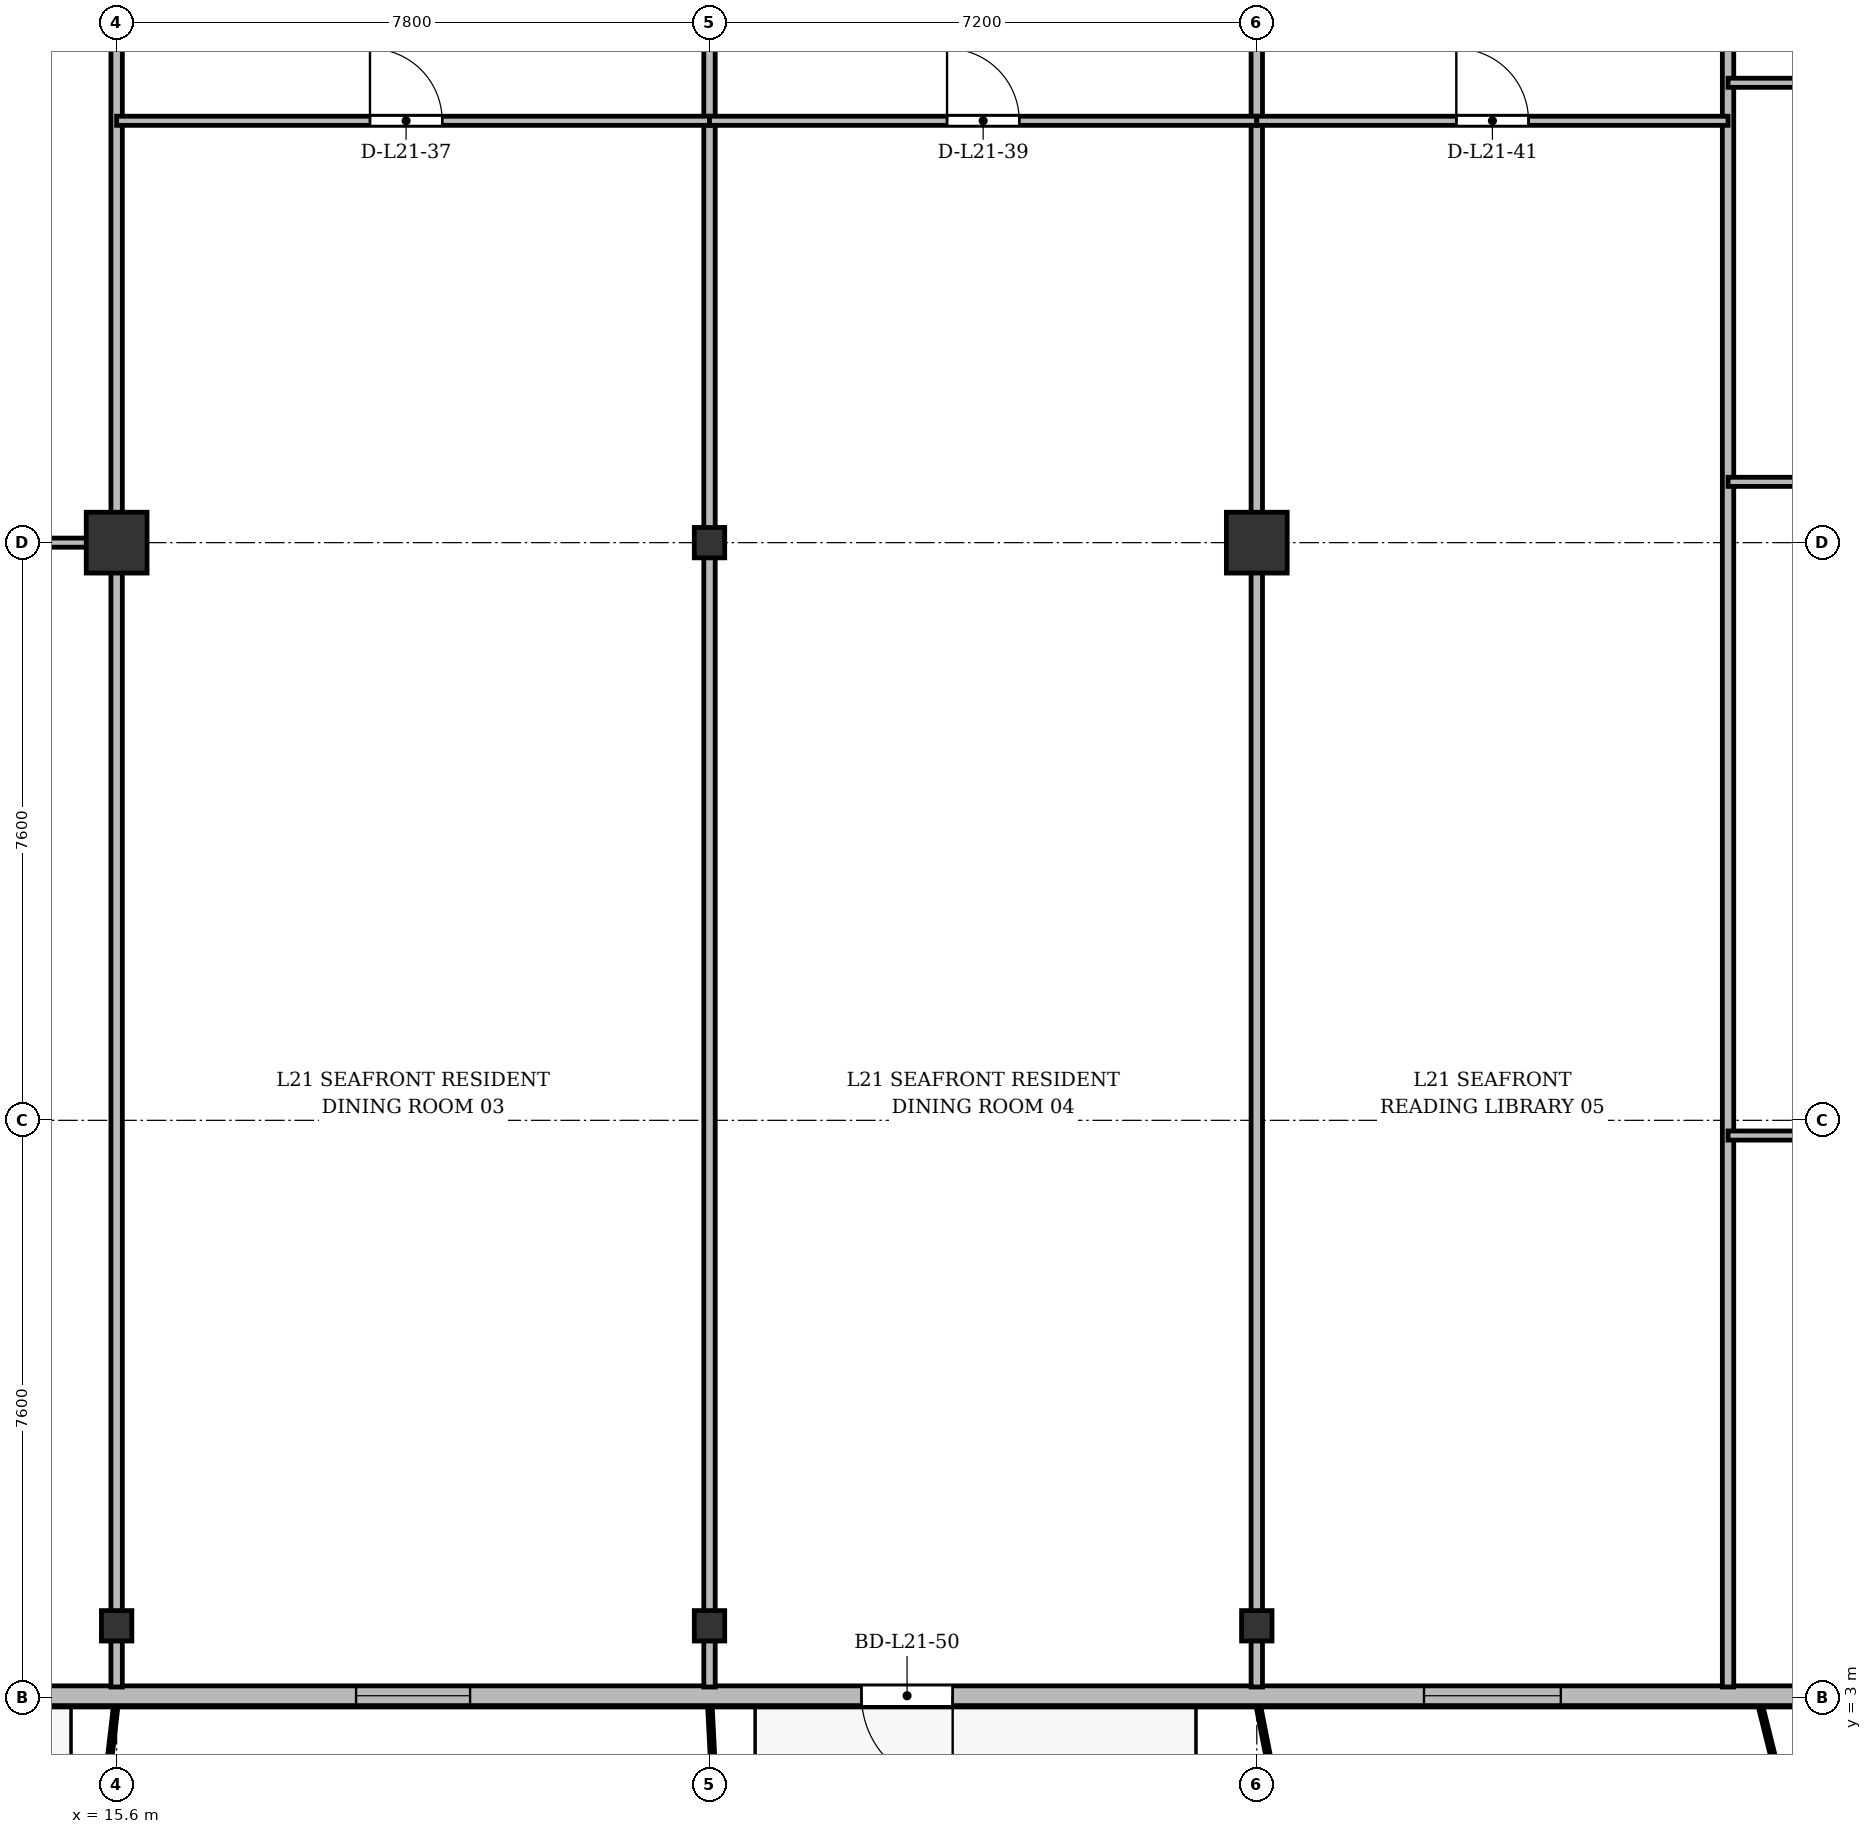
"""IFC4 building model, lengths in metres.
Left out: names, types, materials, properties, quantities, classifications, styles, units other than length and angle.
Written with IfcOpenShell. Run it as: python <this file> out.ifc"""

import sys

from ifc_helpers import new_model, si_unit, direction, frame, frame_2d, origin, origin_2d, place, context, subcontext, project, spatial, rectangle, i_section, extrude, source, transform, mapped, element, fill, save


model = new_model("IFC4")
c1 = context("Model", 3, precision=1e-05, world=origin(), true_north=direction((0.0, 1.0)))
c2 = subcontext(c1, "Body", "Model", "MODEL_VIEW")
j1 = project(units=[si_unit("LENGTHUNIT", "METRE"), si_unit("PLANEANGLEUNIT", "RADIAN")], contexts=[c1])
p1 = place(None, origin())
s1 = spatial("IfcSite", under=j1, at=p1, CompositionType="ELEMENT")
p2 = place(p1, origin())
s2 = spatial("IfcBuilding", under=s1, at=p2, CompositionType="ELEMENT")
p3 = place(p2, frame((0.0, 0.0, 85.3)))
s3 = spatial("IfcBuildingStorey", under=s2, at=p3, CompositionType="ELEMENT", Elevation=85.3)
m1 = source(origin(), c2, "Body", "SweptSolid", [
    extrude(i_section(OverallWidth=0.4, OverallDepth=0.4, WebThickness=0.022, FlangeThickness=0.035, at=origin_2d()), origin(), (0.0, 0.0, 1.0), 3.6),
])
p4 = place(p3, frame((15.6, 3.95, 0.0), z_axis=(0.0, 0.0, 1.0), x_axis=(1.0, 0.0, 0.0)))
e1 = element("IfcColumn", 1, at=p4, inside=s3, PredefinedType="COLUMN", context=c2, shape_type="MappedRepresentation", body=[
    mapped(m1, transform((0.0, 0.0, 0.0), x_axis=(1.0, 0.0, 0.0), y_axis=(0.0, 1.0, 0.0), z_axis=(0.0, 0.0, 1.0), scale=1.0)),
])
m2 = source(origin(), c2, "Body", "SweptSolid", [
    extrude(rectangle(XDim=0.8, YDim=0.8, at=origin_2d()), origin(), (0.0, 0.0, 1.0), 3.6),
])
p5 = place(p3, frame((15.6, 18.2, 0.0), z_axis=(0.0, 0.0, 1.0), x_axis=(1.0, 0.0, 0.0)))
e2 = element("IfcColumn", 2, at=p5, inside=s3, PredefinedType="COLUMN", context=c2, shape_type="MappedRepresentation", body=[
    mapped(m2, transform((0.0, 0.0, 0.0), x_axis=(1.0, 0.0, 0.0), y_axis=(0.0, 1.0, 0.0), z_axis=(0.0, 0.0, 1.0), scale=1.0)),
])
for number, where, z_axis, x_axis in (
    (3, (23.4, 3.95, 0.0), (0.0, 0.0, 1.0), (1.0, 0.0, 0.0)),
    (4, (23.4, 18.2, 0.0), (0.0, 0.0, 1.0), (1.0, 0.0, 0.0)),
    (5, (30.6, 3.95, 0.0), (0.0, 0.0, 1.0), (1.0, 0.0, 0.0)),
):
    element("IfcColumn", number, at=place(p3, frame(where, z_axis=z_axis, x_axis=x_axis)), inside=s3, PredefinedType="COLUMN", context=c2, shape_type="MappedRepresentation", body=[
        mapped(m1, transform((0.0, 0.0, 0.0), x_axis=(1.0, 0.0, 0.0), y_axis=(0.0, 1.0, 0.0), z_axis=(0.0, 0.0, 1.0), scale=1.0)),
    ])
p6 = place(p3, frame((30.6, 18.2, 0.0), z_axis=(0.0, 0.0, 1.0), x_axis=(1.0, 0.0, 0.0)))
e6 = element("IfcColumn", 6, at=p6, inside=s3, PredefinedType="COLUMN", context=c2, shape_type="MappedRepresentation", body=[
    mapped(m2, transform((0.0, 0.0, 0.0), x_axis=(1.0, 0.0, 0.0), y_axis=(0.0, 1.0, 0.0), z_axis=(0.0, 0.0, 1.0), scale=1.0)),
])
p7 = place(p3, frame((66.9, 3.03, 0.0), z_axis=(0.0, 0.0, 1.0), x_axis=(-1.0, 0.0, 0.0)))
e7 = element("IfcWall", 7, at=p7, inside=s3, PredefinedType="SOLIDWALL", context=c2, shape_type="SweptSolid", body=[
    extrude(rectangle(XDim=59.4, YDim=0.26, at=frame_2d((29.7, 0.0))), origin(), (0.0, 0.0, 1.0), 3.34),
])
p8 = place(p7, frame((0.595, 0.0, 0.9)))
e8 = element("IfcOpeningElement", 8, at=p8, cuts=e7, PredefinedType="OPENING", context=c2, shape_type="SweptSolid", body=[
    extrude(rectangle(XDim=2.2, YDim=1.8, at=frame_2d((1.1, 0.9))), frame((0.0, 0.14, 0.0), z_axis=(0.0, -1.0, 0.0), x_axis=(1.0, 0.0, 0.0)), (0.0, 0.0, 1.0), 0.28),
])
p9 = place(p7, frame((4.95, 0.0, 0.9)))
e9 = element("IfcOpeningElement", 9, at=p9, cuts=e7, PredefinedType="OPENING", context=c2, shape_type="SweptSolid", body=[
    extrude(rectangle(XDim=1.5, YDim=1.75, at=frame_2d((0.75, 0.875))), frame((0.0, 0.14, 0.0), z_axis=(0.0, -1.0, 0.0), x_axis=(1.0, 0.0, 0.0)), (0.0, 0.0, 1.0), 0.28),
])
p10 = place(p7, frame((9.18, 0.0, 0.0)))
e10 = element("IfcOpeningElement", 10, at=p10, cuts=e7, PredefinedType="OPENING", context=c2, shape_type="SweptSolid", body=[
    extrude(rectangle(XDim=1.2, YDim=2.2, at=frame_2d((0.6, 1.1))), frame((0.0, 0.14, 0.0), z_axis=(0.0, -1.0, 0.0), x_axis=(1.0, 0.0, 0.0)), (0.0, 0.0, 1.0), 0.28),
])
p11 = place(p7, frame((13.125, 0.0, 0.9)))
e11 = element("IfcOpeningElement", 11, at=p11, cuts=e7, PredefinedType="OPENING", context=c2, shape_type="SweptSolid", body=[
    extrude(rectangle(XDim=1.65, YDim=1.85, at=frame_2d((0.825, 0.925))), frame((0.0, 0.14, 0.0), z_axis=(0.0, -1.0, 0.0), x_axis=(1.0, 0.0, 0.0)), (0.0, 0.0, 1.0), 0.28),
])
p12 = place(p7, frame((16.2, 0.0, 0.9)))
e12 = element("IfcOpeningElement", 12, at=p12, cuts=e7, PredefinedType="OPENING", context=c2, shape_type="SweptSolid", body=[
    extrude(rectangle(XDim=1.8, YDim=1.8, at=frame_2d((0.9, 0.9))), frame((0.0, 0.14, 0.0), z_axis=(0.0, -1.0, 0.0), x_axis=(1.0, 0.0, 0.0)), (0.0, 0.0, 1.0), 0.28),
])
p13 = place(p7, frame((18.75, 0.0, 0.9)))
e13 = element("IfcOpeningElement", 13, at=p13, cuts=e7, PredefinedType="OPENING", context=c2, shape_type="SweptSolid", body=[
    extrude(rectangle(XDim=1.5, YDim=1.75, at=frame_2d((0.75, 0.875))), frame((0.0, 0.14, 0.0), z_axis=(0.0, -1.0, 0.0), x_axis=(1.0, 0.0, 0.0)), (0.0, 0.0, 1.0), 0.28),
])
p14 = place(p7, frame((21.15, 0.0, 0.9)))
e14 = element("IfcOpeningElement", 14, at=p14, cuts=e7, PredefinedType="OPENING", context=c2, shape_type="SweptSolid", body=[
    extrude(rectangle(XDim=1.5, YDim=1.75, at=frame_2d((0.75, 0.875))), frame((0.0, 0.14, 0.0), z_axis=(0.0, -1.0, 0.0), x_axis=(1.0, 0.0, 0.0)), (0.0, 0.0, 1.0), 0.28),
])
p15 = place(p7, frame((23.85, 0.0, 0.9)))
e15 = element("IfcOpeningElement", 15, at=p15, cuts=e7, PredefinedType="OPENING", context=c2, shape_type="SweptSolid", body=[
    extrude(rectangle(XDim=2.0, YDim=1.95, at=frame_2d((1.0, 0.975))), frame((0.0, 0.14, 0.0), z_axis=(0.0, -1.0, 0.0), x_axis=(1.0, 0.0, 0.0)), (0.0, 0.0, 1.0), 0.28),
])
p16 = place(p7, frame((27.525, 0.0, 0.9)))
e16 = element("IfcOpeningElement", 16, at=p16, cuts=e7, PredefinedType="OPENING", context=c2, shape_type="SweptSolid", body=[
    extrude(rectangle(XDim=1.65, YDim=1.85, at=frame_2d((0.825, 0.925))), frame((0.0, 0.14, 0.0), z_axis=(0.0, -1.0, 0.0), x_axis=(1.0, 0.0, 0.0)), (0.0, 0.0, 1.0), 0.28),
])
p17 = place(p7, frame((32.3, 0.0, 0.9)))
e17 = element("IfcOpeningElement", 17, at=p17, cuts=e7, PredefinedType="OPENING", context=c2, shape_type="SweptSolid", body=[
    extrude(rectangle(XDim=1.8, YDim=1.8, at=frame_2d((0.9, 0.9))), frame((0.0, 0.14, 0.0), z_axis=(0.0, -1.0, 0.0), x_axis=(1.0, 0.0, 0.0)), (0.0, 0.0, 1.0), 0.28),
])
p18 = place(p7, frame((40.301, 0.0, 0.0)))
e18 = element("IfcOpeningElement", 18, at=p18, cuts=e7, PredefinedType="OPENING", context=c2, shape_type="SweptSolid", body=[
    extrude(rectangle(XDim=1.2, YDim=2.2, at=frame_2d((0.6, 1.1))), frame((0.0, 0.14, 0.0), z_axis=(0.0, -1.0, 0.0), x_axis=(1.0, 0.0, 0.0)), (0.0, 0.0, 1.0), 0.28),
])
p19 = place(p7, frame((46.65, 0.0, 0.9)))
e19 = element("IfcOpeningElement", 19, at=p19, cuts=e7, PredefinedType="OPENING", context=c2, shape_type="SweptSolid", body=[
    extrude(rectangle(XDim=1.5, YDim=1.75, at=frame_2d((0.75, 0.875))), frame((0.0, 0.14, 0.0), z_axis=(0.0, -1.0, 0.0), x_axis=(1.0, 0.0, 0.0)), (0.0, 0.0, 1.0), 0.28),
])
p20 = place(p7, frame((54.558, 0.0, 0.0)))
e20 = element("IfcOpeningElement", 20, at=p20, cuts=e7, PredefinedType="OPENING", context=c2, shape_type="SweptSolid", body=[
    extrude(rectangle(XDim=1.2, YDim=2.2, at=frame_2d((0.6, 1.1))), frame((0.0, 0.14, 0.0), z_axis=(0.0, -1.0, 0.0), x_axis=(1.0, 0.0, 0.0)), (0.0, 0.0, 1.0), 0.28),
])
p21 = place(p7, frame((56.98, 0.0, 0.9)))
e21 = element("IfcOpeningElement", 21, at=p21, cuts=e7, PredefinedType="OPENING", context=c2, shape_type="SweptSolid", body=[
    extrude(rectangle(XDim=1.65, YDim=1.85, at=frame_2d((0.825, 0.925))), frame((0.0, 0.14, 0.0), z_axis=(0.0, -1.0, 0.0), x_axis=(1.0, 0.0, 0.0)), (0.0, 0.0, 1.0), 0.28),
])
for number, where, z_axis, x_axis in (
    (22, (15.6, 3.145, 0.0), (0.0, 0.0, 1.0), (0.0, 1.0, 0.0)),
    (23, (23.4, 3.145, 0.0), (0.0, 0.0, 1.0), (0.0, 1.0, 0.0)),
    (24, (30.6, 3.145, 0.0), (0.0, 0.0, 1.0), (0.0, 1.0, 0.0)),
):
    element("IfcWall", number, at=place(p3, frame(where, z_axis=z_axis, x_axis=x_axis)), inside=s3, PredefinedType="PARTITIONING", context=c2, shape_type="SweptSolid", body=[
        extrude(rectangle(XDim=24.455, YDim=0.15, at=frame_2d((12.228, 0.0))), origin(), (0.0, 0.0, 1.0), 2.84),
    ])
p22 = place(p3, frame((36.8, 3.145, 0.0), z_axis=(0.0, 0.0, 1.0), x_axis=(0.0, 1.0, 0.0)))
e25 = element("IfcWall", 25, at=p22, inside=s3, PredefinedType="PARTITIONING", context=c2, shape_type="SweptSolid", body=[
    extrude(rectangle(XDim=24.455, YDim=0.15, at=frame_2d((12.228, 0.0))), origin(), (0.0, 0.0, 1.0), 2.752),
])
p23 = place(p3, frame((10.6, 18.2, 0.0), z_axis=(0.0, 0.0, 1.0), x_axis=(1.0, 0.0, 0.0)))
e26 = element("IfcWall", 26, at=p23, inside=s3, PredefinedType="PARTITIONING", context=c2, shape_type="SweptSolid", body=[
    extrude(rectangle(XDim=5.0, YDim=0.12, at=frame_2d((2.5, 0.0))), origin(), (0.0, 0.0, 1.0), 2.752),
])
p24 = place(p23, frame((2.025, 0.0, 0.0)))
e27 = element("IfcOpeningElement", 27, at=p24, cuts=e26, PredefinedType="OPENING", context=c2, shape_type="SweptSolid", body=[
    extrude(rectangle(XDim=0.95, YDim=2.15, at=frame_2d((0.475, 1.075))), frame((0.0, 0.07, 0.0), z_axis=(0.0, -1.0, 0.0), x_axis=(1.0, 0.0, 0.0)), (0.0, 0.0, 1.0), 0.14),
])
p25 = place(p3, frame((15.6, 23.75, 0.0), z_axis=(0.0, 0.0, 1.0), x_axis=(1.0, 0.0, 0.0)))
e28 = element("IfcWall", 28, at=p25, inside=s3, PredefinedType="PARTITIONING", context=c2, shape_type="SweptSolid", body=[
    extrude(rectangle(XDim=7.8, YDim=0.12, at=frame_2d((3.9, 0.0))), origin(), (0.0, 0.0, 1.0), 2.84),
])
p26 = place(p25, frame((3.333, 0.0, 0.0)))
e29 = element("IfcOpeningElement", 29, at=p26, cuts=e28, PredefinedType="OPENING", context=c2, shape_type="SweptSolid", body=[
    extrude(rectangle(XDim=0.95, YDim=2.15, at=frame_2d((0.475, 1.075))), frame((0.0, 0.07, 0.0), z_axis=(0.0, -1.0, 0.0), x_axis=(1.0, 0.0, 0.0)), (0.0, 0.0, 1.0), 0.14),
])
p27 = place(p3, frame((23.4, 23.75, 0.0), z_axis=(0.0, 0.0, 1.0), x_axis=(1.0, 0.0, 0.0)))
e30 = element("IfcWall", 30, at=p27, inside=s3, PredefinedType="PARTITIONING", context=c2, shape_type="SweptSolid", body=[
    extrude(rectangle(XDim=7.2, YDim=0.12, at=frame_2d((3.6, 0.0))), origin(), (0.0, 0.0, 1.0), 2.84),
])
p28 = place(p27, frame((3.125, 0.0, 0.0)))
e31 = element("IfcOpeningElement", 31, at=p28, cuts=e30, PredefinedType="OPENING", context=c2, shape_type="SweptSolid", body=[
    extrude(rectangle(XDim=0.95, YDim=2.15, at=frame_2d((0.475, 1.075))), frame((0.0, 0.07, 0.0), z_axis=(0.0, -1.0, 0.0), x_axis=(1.0, 0.0, 0.0)), (0.0, 0.0, 1.0), 0.14),
])
p29 = place(p3, frame((30.6, 23.75, 0.0), z_axis=(0.0, 0.0, 1.0), x_axis=(1.0, 0.0, 0.0)))
e32 = element("IfcWall", 32, at=p29, inside=s3, PredefinedType="PARTITIONING", context=c2, shape_type="SweptSolid", body=[
    extrude(rectangle(XDim=6.2, YDim=0.12, at=frame_2d((3.1, 0.0))), origin(), (0.0, 0.0, 1.0), 2.84),
])
p30 = place(p29, frame((2.625, 0.0, 0.0)))
e33 = element("IfcOpeningElement", 33, at=p30, cuts=e32, PredefinedType="OPENING", context=c2, shape_type="SweptSolid", body=[
    extrude(rectangle(XDim=0.95, YDim=2.15, at=frame_2d((0.475, 1.075))), frame((0.0, 0.07, 0.0), z_axis=(0.0, -1.0, 0.0), x_axis=(1.0, 0.0, 0.0)), (0.0, 0.0, 1.0), 0.14),
])
p31 = place(p3, frame((36.8, 19.0, 0.0), z_axis=(0.0, 0.0, 1.0), x_axis=(1.0, 0.0, 0.0)))
e34 = element("IfcWall", 34, at=p31, inside=s3, PredefinedType="PARTITIONING", context=c2, shape_type="SweptSolid", body=[
    extrude(rectangle(XDim=7.0, YDim=0.12, at=frame_2d((3.5, 0.0))), origin(), (0.0, 0.0, 1.0), 2.84),
])
p32 = place(p31, frame((2.934, 0.0, 0.0)))
e35 = element("IfcOpeningElement", 35, at=p32, cuts=e34, PredefinedType="OPENING", context=c2, shape_type="SweptSolid", body=[
    extrude(rectangle(XDim=0.95, YDim=2.15, at=frame_2d((0.475, 1.075))), frame((0.0, 0.07, 0.0), z_axis=(0.0, -1.0, 0.0), x_axis=(1.0, 0.0, 0.0)), (0.0, 0.0, 1.0), 0.14),
])
p33 = place(p3, frame((36.8, 24.25, 0.0), z_axis=(0.0, 0.0, 1.0), x_axis=(1.0, 0.0, 0.0)))
e36 = element("IfcWall", 36, at=p33, inside=s3, PredefinedType="PARTITIONING", context=c2, shape_type="SweptSolid", body=[
    extrude(rectangle(XDim=2.4, YDim=0.12, at=frame_2d((1.2, 0.0))), origin(), (0.0, 0.0, 1.0), 3.34),
])
p34 = place(p3, frame((36.8, 10.4, 0.0), z_axis=(0.0, 0.0, 1.0), x_axis=(1.0, 0.0, 0.0)))
e37 = element("IfcWall", 37, at=p34, inside=s3, PredefinedType="PARTITIONING", context=c2, shape_type="SweptSolid", body=[
    extrude(rectangle(XDim=3.5, YDim=0.12, at=frame_2d((1.75, 0.0))), origin(), (0.0, 0.0, 1.0), 3.34),
])
p35 = place(p34, frame((1.176, 0.0, 0.0)))
e38 = element("IfcOpeningElement", 38, at=p35, cuts=e37, PredefinedType="OPENING", context=c2, shape_type="SweptSolid", body=[
    extrude(rectangle(XDim=0.95, YDim=2.15, at=frame_2d((0.475, 1.075))), frame((0.0, 0.07, 0.0), z_axis=(0.0, -1.0, 0.0), x_axis=(1.0, 0.0, 0.0)), (0.0, 0.0, 1.0), 0.14),
])
m3 = source(origin(), c2, "Body", "SweptSolid", [
    extrude(rectangle(XDim=1.8, YDim=1.8, at=frame_2d((0.9, 0.9))), frame((0.0, 0.03, 0.0), z_axis=(0.0, -1.0, 0.0), x_axis=(1.0, 0.0, 0.0)), (0.0, 0.0, 1.0), 0.06),
])
p36 = place(p17, origin())
e39 = element("IfcWindow", 39, at=p36, inside=s3, PartitioningType="SINGLE_PANEL", PredefinedType="WINDOW", context=c2, shape_type="MappedRepresentation", body=[
    mapped(m3, transform((0.0, 0.0, 0.0), x_axis=(1.0, 0.0, 0.0), y_axis=(0.0, 1.0, 0.0), z_axis=(0.0, 0.0, 1.0), scale=1.0)),
])
fill(e17, e39)
m4 = source(origin(), c2, "Body", "SweptSolid", [
    extrude(rectangle(XDim=1.2, YDim=2.2, at=frame_2d((0.6, 1.1))), frame((0.0, 0.025, 0.0), z_axis=(0.0, -1.0, 0.0), x_axis=(1.0, 0.0, 0.0)), (0.0, 0.0, 1.0), 0.05),
])
p37 = place(p18, origin())
e40 = element("IfcDoor", 40, at=p37, inside=s3, OperationType="SINGLE_SWING_LEFT", PredefinedType="DOOR", context=c2, shape_type="MappedRepresentation", body=[
    mapped(m4, transform((0.0, 0.0, 0.0), x_axis=(1.0, 0.0, 0.0), y_axis=(0.0, 1.0, 0.0), z_axis=(0.0, 0.0, 1.0), scale=1.0)),
])
fill(e18, e40)
m5 = source(origin(), c2, "Body", "SweptSolid", [
    extrude(rectangle(XDim=1.5, YDim=1.75, at=frame_2d((0.75, 0.875))), frame((0.0, 0.03, 0.0), z_axis=(0.0, -1.0, 0.0), x_axis=(1.0, 0.0, 0.0)), (0.0, 0.0, 1.0), 0.06),
])
p38 = place(p19, origin())
e41 = element("IfcWindow", 41, at=p38, inside=s3, PartitioningType="SINGLE_PANEL", PredefinedType="WINDOW", context=c2, shape_type="MappedRepresentation", body=[
    mapped(m5, transform((0.0, 0.0, 0.0), x_axis=(1.0, 0.0, 0.0), y_axis=(0.0, 1.0, 0.0), z_axis=(0.0, 0.0, 1.0), scale=1.0)),
])
fill(e19, e41)
m6 = source(origin(), c2, "Body", "SweptSolid", [
    extrude(rectangle(XDim=0.95, YDim=2.15, at=frame_2d((0.475, 1.075))), frame((0.0, 0.025, 0.0), z_axis=(0.0, -1.0, 0.0), x_axis=(1.0, 0.0, 0.0)), (0.0, 0.0, 1.0), 0.05),
])
p39 = place(p26, origin())
e42 = element("IfcDoor", 42, at=p39, inside=s3, OperationType="SINGLE_SWING_LEFT", PredefinedType="DOOR", context=c2, shape_type="MappedRepresentation", body=[
    mapped(m6, transform((0.0, 0.0, 0.0), x_axis=(1.0, 0.0, 0.0), y_axis=(0.0, 1.0, 0.0), z_axis=(0.0, 0.0, 1.0), scale=1.0)),
])
fill(e29, e42)
p40 = place(p28, origin())
e43 = element("IfcDoor", 43, at=p40, inside=s3, OperationType="SINGLE_SWING_LEFT", PredefinedType="DOOR", context=c2, shape_type="MappedRepresentation", body=[
    mapped(m6, transform((0.0, 0.0, 0.0), x_axis=(1.0, 0.0, 0.0), y_axis=(0.0, 1.0, 0.0), z_axis=(0.0, 0.0, 1.0), scale=1.0)),
])
fill(e31, e43)
p41 = place(p30, origin())
e44 = element("IfcDoor", 44, at=p41, inside=s3, OperationType="SINGLE_SWING_LEFT", PredefinedType="DOOR", context=c2, shape_type="MappedRepresentation", body=[
    mapped(m6, transform((0.0, 0.0, 0.0), x_axis=(1.0, 0.0, 0.0), y_axis=(0.0, 1.0, 0.0), z_axis=(0.0, 0.0, 1.0), scale=1.0)),
])
fill(e33, e44)
save(model, sys.argv[1])
